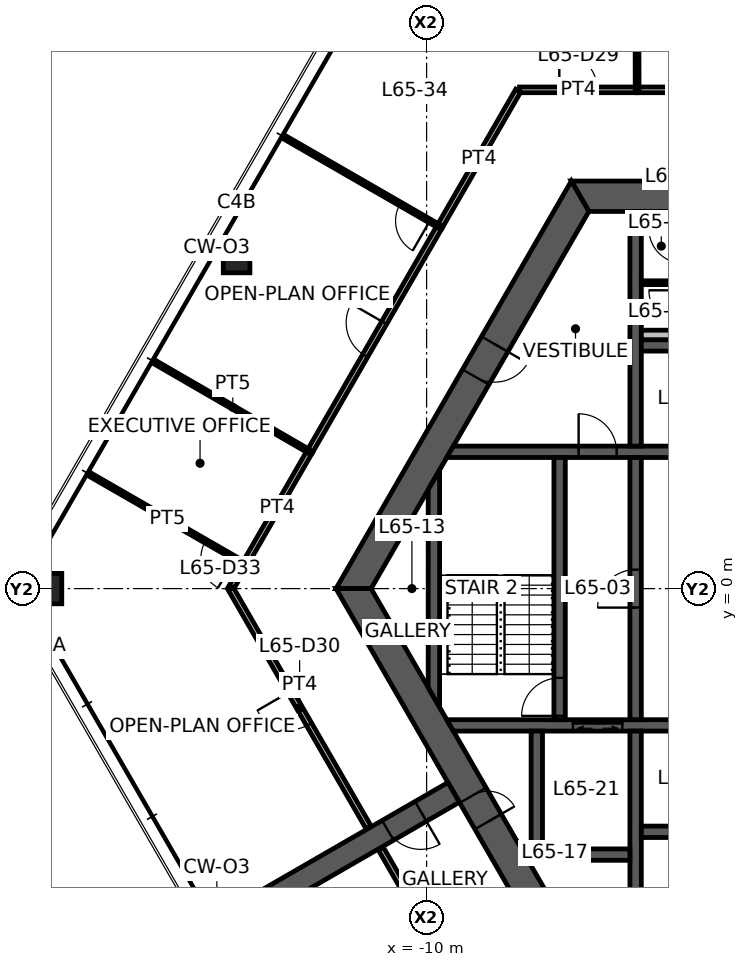
"""IFC4 building model, lengths in metres.
Left out: names, types, materials, properties, quantities, classifications, styles, units other than length and angle.
Written with IfcOpenShell. Run it as: python <this file> out.ifc"""

import sys

from ifc_helpers import new_model, si_unit, direction, frame, frame_2d, origin, origin_2d, place, context, subcontext, project, spatial, polyline, rectangle, hollow_rectangle, outline, extrude, element, fill, save


model = new_model("IFC4")
c1 = context("Model", 3, precision=1e-05, world=origin(), true_north=direction((0.0, 1.0)))
c2 = subcontext(c1, "Body", "Model", "MODEL_VIEW")
j1 = project(units=[si_unit("LENGTHUNIT", "METRE"), si_unit("PLANEANGLEUNIT", "RADIAN")], contexts=[c1])
p1 = place(None, origin())
s1 = spatial("IfcSite", under=j1, at=p1, CompositionType="ELEMENT")
p2 = place(p1, origin())
s2 = spatial("IfcBuilding", under=s1, at=p2, CompositionType="ELEMENT")
p3 = place(p2, frame((0.0, 0.0, 259.6)))
s3 = spatial("IfcBuildingStorey", under=s2, at=p3, CompositionType="ELEMENT", Elevation=259.6)
p4 = place(p3, frame((-20.0, 0.0, 0.0), z_axis=(0.0, 0.0, 1.0), x_axis=(1.0, 0.0, 0.0)))
e1 = element("IfcColumn", 1, at=p4, inside=s3, PredefinedType="COLUMN", context=c2, shape_type="SweptSolid", body=[
    extrude(hollow_rectangle(XDim=0.8, YDim=0.8, WallThickness=0.04, at=origin_2d()), origin(), (0.0, 0.0, 1.0), 3.9),
])
p5 = place(p3, frame((-15.0, 8.66, 0.0), z_axis=(0.0, 0.0, 1.0), x_axis=(1.0, 0.0, 0.0)))
e2 = element("IfcColumn", 2, at=p5, inside=s3, PredefinedType="COLUMN", context=c2, shape_type="SweptSolid", body=[
    extrude(hollow_rectangle(XDim=0.7, YDim=0.7, WallThickness=0.032, at=origin_2d()), origin(), (0.0, 0.0, 1.0), 3.9),
])
p6 = place(p3, frame((5.961, 10.325, 0.0), z_axis=(0.0, 0.0, 1.0), x_axis=(-1.0, 0.0, 0.0)))
e3 = element("IfcWall", 3, at=p6, inside=s3, PredefinedType="SHEAR", context=c2, shape_type="SweptSolid", body=[
    extrude(outline(polyline([(-0.231, -0.4), (4.636, -0.4), (5.536, -0.4), (6.386, -0.4), (7.286, -0.4), (12.153, -0.4), (11.691, 0.4), (7.286, 0.4), (6.386, 0.4), (5.536, 0.4), (4.636, 0.4), (0.231, 0.4), (-0.231, -0.4)])), origin(), (0.0, 0.0, 1.0), 3.9),
])
p7 = place(p6, frame((6.386, 0.0, 0.0)))
e4 = element("IfcOpeningElement", 4, at=p7, cuts=e3, PredefinedType="OPENING", context=c2, shape_type="SweptSolid", body=[
    extrude(rectangle(XDim=0.9, YDim=2.1, at=frame_2d((0.45, 1.05))), frame((0.0, 0.41, 0.0), z_axis=(0.0, -1.0, 0.0), x_axis=(1.0, 0.0, 0.0)), (0.0, 0.0, 1.0), 0.82),
])
p8 = place(p6, frame((4.636, 0.0, 0.0)))
e5 = element("IfcOpeningElement", 5, at=p8, cuts=e3, PredefinedType="OPENING", context=c2, shape_type="SweptSolid", body=[
    extrude(rectangle(XDim=0.9, YDim=2.1, at=frame_2d((0.45, 1.05))), frame((0.0, 0.41, 0.0), z_axis=(0.0, -1.0, 0.0), x_axis=(1.0, 0.0, 0.0)), (0.0, 0.0, 1.0), 0.82),
])
p9 = place(p3, frame((-5.961, 10.325, 0.0), z_axis=(0.0, 0.0, 1.0), x_axis=(-0.500004296715, -0.866022923061, 0.0)))
e6 = element("IfcWall", 6, at=p9, inside=s3, PredefinedType="SHEAR", context=c2, shape_type="SweptSolid", body=[
    extrude(outline(polyline([(-0.231, -0.4), (4.494, -0.4), (5.494, -0.4), (12.153, -0.4), (11.691, 0.4), (5.494, 0.4), (4.494, 0.4), (0.231, 0.4), (-0.231, -0.4)])), origin(), (0.0, 0.0, 1.0), 3.9),
])
p10 = place(p9, frame((4.494, 0.0, 0.0)))
e7 = element("IfcOpeningElement", 7, at=p10, cuts=e6, PredefinedType="OPENING", context=c2, shape_type="SweptSolid", body=[
    extrude(rectangle(XDim=1.0, YDim=2.1, at=frame_2d((0.5, 1.05))), frame((0.0, 0.41, 0.0), z_axis=(0.0, -1.0, 0.0), x_axis=(1.0, 0.0, 0.0)), (0.0, 0.0, 1.0), 0.82),
])
p11 = place(p3, frame((-11.922, 0.0, 0.0), z_axis=(0.0, 0.0, 1.0), x_axis=(0.500004296715, -0.866022923061, 0.0)))
e8 = element("IfcWall", 8, at=p11, inside=s3, PredefinedType="SHEAR", context=c2, shape_type="SweptSolid", body=[
    extrude(outline(polyline([(-0.231, -0.4), (6.281, -0.4), (7.081, -0.4), (12.153, -0.4), (11.691, 0.4), (7.081, 0.4), (6.281, 0.4), (0.231, 0.4), (-0.231, -0.4)])), origin(), (0.0, 0.0, 1.0), 3.9),
])
p12 = place(p11, frame((6.281, 0.0, 0.0)))
e9 = element("IfcOpeningElement", 9, at=p12, cuts=e8, PredefinedType="OPENING", context=c2, shape_type="SweptSolid", body=[
    extrude(rectangle(XDim=0.8, YDim=2.1, at=frame_2d((0.4, 1.05))), frame((0.0, 0.41, 0.0), z_axis=(0.0, -1.0, 0.0), x_axis=(1.0, 0.0, 0.0)), (0.0, 0.0, 1.0), 0.82),
])
p13 = place(p3, frame((-9.288, -5.363, 0.0), z_axis=(0.0, 0.0, 1.0), x_axis=(-0.866027473358, -0.499996415376, 0.0)))
e10 = element("IfcWall", 10, at=p13, inside=s3, PredefinedType="SHEAR", context=c2, shape_type="SweptSolid", body=[
    extrude(rectangle(XDim=7.045, YDim=0.6, at=frame_2d((3.523, 0.0))), origin(), (0.0, 0.0, 1.0), 3.9),
])
p14 = place(p13, frame((1.0, 0.0, 0.0)))
e11 = element("IfcOpeningElement", 11, at=p14, cuts=e10, PredefinedType="OPENING", context=c2, shape_type="SweptSolid", body=[
    extrude(rectangle(XDim=1.0, YDim=2.1, at=frame_2d((0.5, 1.05))), frame((0.0, 0.31, 0.0), z_axis=(0.0, -1.0, 0.0), x_axis=(1.0, 0.0, 0.0)), (0.0, 0.0, 1.0), 0.62),
])
p15 = place(p3, frame((-9.382, 3.6, 0.0), z_axis=(0.0, 0.0, 1.0), x_axis=(1.0, 0.0, 0.0)))
e12 = element("IfcWall", 12, at=p15, inside=s3, PredefinedType="SHEAR", context=c2, shape_type="SweptSolid", body=[
    extrude(outline(polyline([(-0.087, -0.15), (3.382, -0.15), (4.382, -0.15), (5.782, -0.15), (6.882, -0.15), (7.932, -0.15), (7.932, 0.15), (6.882, 0.15), (5.782, 0.15), (4.382, 0.15), (3.382, 0.15), (0.087, 0.15), (-0.087, -0.15)])), origin(), (0.0, 0.0, 1.0), 3.9),
])
p16 = place(p15, frame((3.382, 0.0, 0.0)))
e13 = element("IfcOpeningElement", 13, at=p16, cuts=e12, PredefinedType="OPENING", context=c2, shape_type="SweptSolid", body=[
    extrude(rectangle(XDim=1.0, YDim=2.1, at=frame_2d((0.5, 1.05))), frame((0.0, 0.16, 0.0), z_axis=(0.0, -1.0, 0.0), x_axis=(1.0, 0.0, 0.0)), (0.0, 0.0, 1.0), 0.32),
])
p17 = place(p15, frame((5.782, 0.0, 0.0)))
e14 = element("IfcOpeningElement", 14, at=p17, cuts=e12, PredefinedType="OPENING", context=c2, shape_type="SweptSolid", body=[
    extrude(rectangle(XDim=1.1, YDim=2.1, at=frame_2d((0.55, 1.05))), frame((0.0, 0.16, 0.0), z_axis=(0.0, -1.0, 0.0), x_axis=(1.0, 0.0, 0.0)), (0.0, 0.0, 1.0), 0.32),
])
p18 = place(p3, frame((-9.382, -3.6, 0.0), z_axis=(0.0, 0.0, 1.0), x_axis=(1.0, 0.0, 0.0)))
e15 = element("IfcWall", 15, at=p18, inside=s3, PredefinedType="SHEAR", context=c2, shape_type="SweptSolid", body=[
    extrude(outline(polyline([(0.087, -0.15), (3.232, -0.15), (4.532, -0.15), (5.782, -0.15), (6.882, -0.15), (7.932, -0.15), (7.932, 0.15), (6.882, 0.15), (5.782, 0.15), (4.532, 0.15), (3.232, 0.15), (-0.087, 0.15), (0.087, -0.15)])), origin(), (0.0, 0.0, 1.0), 3.9),
])
p19 = place(p18, frame((5.782, 0.0, 0.0)))
e16 = element("IfcOpeningElement", 16, at=p19, cuts=e15, PredefinedType="OPENING", context=c2, shape_type="SweptSolid", body=[
    extrude(rectangle(XDim=1.1, YDim=2.1, at=frame_2d((0.55, 1.05))), frame((0.0, 0.16, 0.0), z_axis=(0.0, -1.0, 0.0), x_axis=(1.0, 0.0, 0.0)), (0.0, 0.0, 1.0), 0.32),
])
p20 = place(p18, frame((3.232, 0.0, 0.0)))
e17 = element("IfcOpeningElement", 17, at=p20, cuts=e15, PredefinedType="OPENING", context=c2, shape_type="SweptSolid", body=[
    extrude(rectangle(XDim=1.3, YDim=2.1, at=frame_2d((0.65, 1.05))), frame((0.0, 0.16, 0.0), z_axis=(0.0, -1.0, 0.0), x_axis=(1.0, 0.0, 0.0)), (0.0, 0.0, 1.0), 0.32),
])
p21 = place(p3, frame((-4.5, -3.45, 0.0), z_axis=(0.0, 0.0, 1.0), x_axis=(0.0, 1.0, 0.0)))
e18 = element("IfcWall", 18, at=p21, inside=s3, PredefinedType="SHEAR", context=c2, shape_type="SweptSolid", body=[
    extrude(rectangle(XDim=6.9, YDim=0.3, at=frame_2d((3.45, 0.0))), origin(), (0.0, 0.0, 1.0), 3.9),
])
p22 = place(p21, frame((2.95, 0.0, 0.0)))
e19 = element("IfcOpeningElement", 19, at=p22, cuts=e18, PredefinedType="OPENING", context=c2, shape_type="SweptSolid", body=[
    extrude(rectangle(XDim=1.0, YDim=2.1, at=frame_2d((0.5, 1.05))), frame((0.0, 0.16, 0.0), z_axis=(0.0, -1.0, 0.0), x_axis=(1.0, 0.0, 0.0)), (0.0, 0.0, 1.0), 0.32),
])
p23 = place(p3, frame((-6.5, -3.45, 0.0), z_axis=(0.0, 0.0, 1.0), x_axis=(0.0, 1.0, 0.0)))
e20 = element("IfcWall", 20, at=p23, inside=s3, PredefinedType="SHEAR", context=c2, shape_type="SweptSolid", body=[
    extrude(rectangle(XDim=6.9, YDim=0.3, at=frame_2d((3.45, 0.0))), origin(), (0.0, 0.0, 1.0), 3.9),
])
p24 = place(p23, frame((0.1, 0.0, 0.0)))
e21 = element("IfcOpeningElement", 21, at=p24, cuts=e20, PredefinedType="OPENING", context=c2, shape_type="SweptSolid", body=[
    extrude(rectangle(XDim=1.0, YDim=2.1, at=frame_2d((0.5, 1.05))), frame((0.0, 0.16, 0.0), z_axis=(0.0, -1.0, 0.0), x_axis=(1.0, 0.0, 0.0)), (0.0, 0.0, 1.0), 0.32),
])
for number, where, z_axis, x_axis in (
    (22, (-4.5, 3.75, 0.0), (0.0, 0.0, 1.0), (0.0, 1.0, 0.0)),
    (23, (-4.5, -3.75, 0.0), (0.0, 0.0, 1.0), (0.0, -1.0, 0.0)),
):
    element("IfcWall", number, at=place(p3, frame(where, z_axis=z_axis, x_axis=x_axis)), inside=s3, PredefinedType="SHEAR", context=c2, shape_type="SweptSolid", body=[
        extrude(rectangle(XDim=6.175, YDim=0.3, at=frame_2d((3.087, 0.0))), origin(), (0.0, 0.0, 1.0), 3.9),
    ])
for number, where, z_axis, x_axis in (
    (24, (-4.35, 6.4, 0.0), (0.0, 0.0, 1.0), (1.0, 0.0, 0.0)),
    (25, (-4.35, -6.4, 0.0), (0.0, 0.0, 1.0), (1.0, 0.0, 0.0)),
    (26, (-7.25, -7.0, 0.0), (0.0, 0.0, 1.0), (1.0, 0.0, 0.0)),
):
    element("IfcWall", number, at=place(p3, frame(where, z_axis=z_axis, x_axis=x_axis)), inside=s3, PredefinedType="SHEAR", context=c2, shape_type="SweptSolid", body=[
        extrude(rectangle(XDim=2.6, YDim=0.3, at=frame_2d((1.3, 0.0))), origin(), (0.0, 0.0, 1.0), 3.9),
    ])
p25 = place(p3, frame((-7.1, -3.75, 0.0), z_axis=(0.0, 0.0, 1.0), x_axis=(0.0, -1.0, 0.0)))
e27 = element("IfcWall", 27, at=p25, inside=s3, PredefinedType="SHEAR", context=c2, shape_type="SweptSolid", body=[
    extrude(rectangle(XDim=3.1, YDim=0.3, at=frame_2d((1.55, 0.0))), origin(), (0.0, 0.0, 1.0), 3.9),
])
p26 = place(p3, frame((-9.808, -2.862, 0.0), z_axis=(0.0, 0.0, 1.0), x_axis=(0.0, 1.0, 0.0)))
e28 = element("IfcWall", 28, at=p26, inside=s3, PredefinedType="SHEAR", context=c2, shape_type="SweptSolid", body=[
    extrude(outline(polyline([(-0.26, -0.15), (5.984, -0.15), (5.465, 0.15), (0.26, 0.15), (-0.26, -0.15)])), origin(), (0.0, 0.0, 1.0), 3.9),
])
p27 = place(p3, frame((-4.35, 6.675, 0.0), z_axis=(0.0, 0.0, 1.0), x_axis=(1.0, 0.0, 0.0)))
e29 = element("IfcWall", 29, at=p27, inside=s3, PredefinedType="PLUMBINGWALL", context=c2, shape_type="SweptSolid", body=[
    extrude(rectangle(XDim=2.6, YDim=0.25, at=frame_2d((1.3, 0.0))), origin(), (0.0, 0.0, 1.0), 3.9),
])
p28 = place(p3, frame((-3.3, 8.05, 0.0), z_axis=(0.0, 0.0, 1.0), x_axis=(-1.0, 0.0, 0.0)))
e30 = element("IfcWall", 30, at=p28, inside=s3, PredefinedType="PARTITIONING", context=c2, shape_type="SweptSolid", body=[
    extrude(rectangle(XDim=1.05, YDim=0.1, at=frame_2d((0.525, 0.0))), origin(), (0.0, 0.0, 1.0), 2.95),
])
p29 = place(p3, frame((-4.47, 13.125, 0.0), z_axis=(0.0, 0.0, 1.0), x_axis=(1.0, 0.0, 0.0)))
e31 = element("IfcWall", 31, at=p29, inside=s3, PredefinedType="PARTITIONING", context=c2, shape_type="SweptSolid", body=[
    extrude(rectangle(XDim=2.575, YDim=0.15, at=frame_2d((1.288, 0.0))), origin(), (0.0, 0.0, 1.0), 2.95),
])
p30 = place(p29, frame((0.788, 0.0, 0.0)))
e32 = element("IfcOpeningElement", 32, at=p30, cuts=e31, PredefinedType="OPENING", context=c2, shape_type="SweptSolid", body=[
    extrude(rectangle(XDim=1.0, YDim=2.1, at=frame_2d((0.5, 1.05))), frame((0.0, 0.085, 0.0), z_axis=(0.0, -1.0, 0.0), x_axis=(1.0, 0.0, 0.0)), (0.0, 0.0, 1.0), 0.17),
])
p31 = place(p3, frame((-7.555, 13.125, 0.0), z_axis=(0.0, 0.0, 1.0), x_axis=(1.0, 0.0, 0.0)))
e33 = element("IfcWall", 33, at=p31, inside=s3, PredefinedType="PARTITIONING", context=c2, shape_type="SweptSolid", body=[
    extrude(rectangle(XDim=3.094, YDim=0.15, at=frame_2d((1.547, 0.0))), origin(), (0.0, 0.0, 1.0), 2.95),
])
p32 = place(p31, frame((1.047, 0.0, 0.0)))
e34 = element("IfcOpeningElement", 34, at=p32, cuts=e33, PredefinedType="OPENING", context=c2, shape_type="SweptSolid", body=[
    extrude(rectangle(XDim=1.0, YDim=2.1, at=frame_2d((0.5, 1.05))), frame((0.0, 0.085, 0.0), z_axis=(0.0, -1.0, 0.0), x_axis=(1.0, 0.0, 0.0)), (0.0, 0.0, 1.0), 0.17),
])
p33 = place(p3, frame((-4.46, 13.125, 0.0), z_axis=(0.0, 0.0, 1.0), x_axis=(-0.001656637364, 0.999998627775, 0.0)))
e35 = element("IfcWall", 35, at=p33, inside=s3, PredefinedType="PARTITIONING", context=c2, shape_type="SweptSolid", body=[
    extrude(rectangle(XDim=2.8, YDim=0.1, at=frame_2d((1.4, 0.0))), origin(), (0.0, 0.0, 1.0), 2.95),
])
p34 = place(p3, frame((-9.661, 9.516, 0.0), z_axis=(0.0, 0.0, 1.0), x_axis=(0.499997836828, 0.866026652689, 0.0)))
e36 = element("IfcWall", 36, at=p34, inside=s3, PredefinedType="PARTITIONING", context=c2, shape_type="SweptSolid", body=[
    extrude(rectangle(XDim=4.144, YDim=0.15, at=frame_2d((2.072, 0.0))), origin(), (0.0, 0.0, 1.0), 2.95),
])
p35 = place(p3, frame((-14.785, 0.642, 0.0), z_axis=(0.0, 0.0, 1.0), x_axis=(0.500032973541, 0.866006365664, 0.0)))
e37 = element("IfcWall", 37, at=p35, inside=s3, PredefinedType="PARTITIONING", context=c2, shape_type="SweptSolid", body=[
    extrude(rectangle(XDim=3.426, YDim=0.15, at=frame_2d((1.713, 0.0))), origin(), (0.0, 0.0, 1.0), 2.95),
])
p36 = place(p3, frame((-15.156, 0.0, 0.0), z_axis=(0.0, 0.0, 1.0), x_axis=(0.500088105676, 0.865974529972, 0.0)))
e38 = element("IfcWall", 38, at=p36, inside=s3, PredefinedType="PARTITIONING", context=c2, shape_type="SweptSolid", body=[
    extrude(rectangle(XDim=0.751, YDim=0.15, at=frame_2d((0.375, 0.0))), origin(), (0.0, 0.0, 1.0), 2.95),
])
p37 = place(p3, frame((-11.527, -6.285, 0.0), z_axis=(0.0, 0.0, 1.0), x_axis=(-0.500002959843, 0.866023694911, 0.0)))
e39 = element("IfcWall", 39, at=p37, inside=s3, PredefinedType="PARTITIONING", context=c2, shape_type="SweptSolid", body=[
    extrude(rectangle(XDim=7.258, YDim=0.15, at=frame_2d((3.629, 0.0))), origin(), (0.0, 0.0, 1.0), 2.95),
])
p38 = place(p37, frame((3.129, 0.0, 0.0)))
e40 = element("IfcOpeningElement", 40, at=p38, cuts=e39, PredefinedType="OPENING", context=c2, shape_type="SweptSolid", body=[
    extrude(rectangle(XDim=1.0, YDim=2.1, at=frame_2d((0.5, 1.05))), frame((0.0, 0.085, 0.0), z_axis=(0.0, -1.0, 0.0), x_axis=(1.0, 0.0, 0.0)), (0.0, 0.0, 1.0), 0.17),
])
p39 = place(p3, frame((-13.077, 3.601, 0.0), z_axis=(0.0, 0.0, 1.0), x_axis=(0.500004632818, 0.866022729009, 0.0)))
e41 = element("IfcWall", 41, at=p39, inside=s3, PredefinedType="PARTITIONING", context=c2, shape_type="SweptSolid", body=[
    extrude(rectangle(XDim=6.84, YDim=0.15, at=frame_2d((3.42, 0.0))), origin(), (0.0, 0.0, 1.0), 2.95),
])
p40 = place(p39, frame((2.92, 0.0, 0.0)))
e42 = element("IfcOpeningElement", 42, at=p40, cuts=e41, PredefinedType="OPENING", context=c2, shape_type="SweptSolid", body=[
    extrude(rectangle(XDim=1.0, YDim=2.1, at=frame_2d((0.5, 1.05))), frame((0.0, 0.085, 0.0), z_axis=(0.0, -1.0, 0.0), x_axis=(1.0, 0.0, 0.0)), (0.0, 0.0, 1.0), 0.17),
])
p41 = place(p3, frame((-9.656, 9.524, 0.0), z_axis=(0.0, 0.0, 1.0), x_axis=(-0.866526579402, 0.499130931911, 0.0)))
e43 = element("IfcWall", 43, at=p41, inside=s3, PredefinedType="PARTITIONING", context=c2, shape_type="SweptSolid", body=[
    extrude(rectangle(XDim=4.705, YDim=0.1, at=frame_2d((2.353, 0.0))), origin(), (0.0, 0.0, 1.0), 2.95),
])
p42 = place(p41, frame((0.3, 0.0, 0.0)))
e44 = element("IfcOpeningElement", 44, at=p42, cuts=e43, PredefinedType="OPENING", context=c2, shape_type="SweptSolid", body=[
    extrude(rectangle(XDim=0.9, YDim=2.1, at=frame_2d((0.45, 1.05))), frame((0.0, 0.06, 0.0), z_axis=(0.0, -1.0, 0.0), x_axis=(1.0, 0.0, 0.0)), (0.0, 0.0, 1.0), 0.12),
])
p43 = place(p3, frame((-14.78, 0.651, 0.0), z_axis=(0.0, 0.0, 1.0), x_axis=(-0.866504138439, 0.499169888984, 0.0)))
e45 = element("IfcWall", 45, at=p43, inside=s3, PredefinedType="PARTITIONING", context=c2, shape_type="SweptSolid", body=[
    extrude(rectangle(XDim=4.706, YDim=0.1, at=frame_2d((2.353, 0.0))), origin(), (0.0, 0.0, 1.0), 2.95),
])
p44 = place(p43, frame((0.3, 0.0, 0.0)))
e46 = element("IfcOpeningElement", 46, at=p44, cuts=e45, PredefinedType="OPENING", context=c2, shape_type="SweptSolid", body=[
    extrude(rectangle(XDim=0.9, YDim=2.1, at=frame_2d((0.45, 1.05))), frame((0.0, 0.06, 0.0), z_axis=(0.0, -1.0, 0.0), x_axis=(1.0, 0.0, 0.0)), (0.0, 0.0, 1.0), 0.12),
])
p45 = place(p3, frame((-17.123, 5.942, 0.0), z_axis=(0.0, 0.0, 1.0), x_axis=(0.86551803214, -0.500877765568, 0.0)))
e47 = element("IfcWall", 47, at=p45, inside=s3, PredefinedType="PARTITIONING", context=c2, shape_type="SweptSolid", body=[
    extrude(rectangle(XDim=4.675, YDim=0.1, at=frame_2d((2.338, 0.0))), origin(), (0.0, 0.0, 1.0), 2.95),
])
p46 = place(p3, frame((-10.564, -7.952, 0.0), z_axis=(0.0, 0.0, 1.0), x_axis=(-0.500084415177, 0.865976661173, 0.0)))
e48 = element("IfcWall", 48, at=p46, inside=s3, PredefinedType="PARTITIONING", context=c2, shape_type="SweptSolid", body=[
    extrude(rectangle(XDim=1.284, YDim=0.15, at=frame_2d((0.642, 0.0))), origin(), (0.0, 0.0, 1.0), 2.95),
])
p47 = place(p12, origin())
e49 = element("IfcDoor", 49, at=p47, inside=s3, OperationType="SINGLE_SWING_RIGHT", PredefinedType="DOOR", context=c2, shape_type="SweptSolid", body=[
    extrude(rectangle(XDim=0.8, YDim=2.1, at=frame_2d((0.4, 1.05))), frame((0.0, 0.025, 0.0), z_axis=(0.0, -1.0, 0.0), x_axis=(1.0, 0.0, 0.0)), (0.0, 0.0, 1.0), 0.05),
])
fill(e9, e49)
p48 = place(p10, origin())
e50 = element("IfcDoor", 50, at=p48, inside=s3, OperationType="SINGLE_SWING_LEFT", PredefinedType="DOOR", context=c2, shape_type="SweptSolid", body=[
    extrude(rectangle(XDim=1.0, YDim=2.1, at=frame_2d((0.5, 1.05))), frame((0.0, 0.025, 0.0), z_axis=(0.0, -1.0, 0.0), x_axis=(1.0, 0.0, 0.0)), (0.0, 0.0, 1.0), 0.05),
])
fill(e7, e50)
p49 = place(p22, origin())
e51 = element("IfcDoor", 51, at=p49, inside=s3, OperationType="SINGLE_SWING_LEFT", PredefinedType="DOOR", context=c2, shape_type="SweptSolid", body=[
    extrude(rectangle(XDim=1.0, YDim=2.1, at=frame_2d((0.5, 1.05))), frame((0.0, 0.025, 0.0), z_axis=(0.0, -1.0, 0.0), x_axis=(1.0, 0.0, 0.0)), (0.0, 0.0, 1.0), 0.05),
])
fill(e19, e51)
p50 = place(p24, origin())
e52 = element("IfcDoor", 52, at=p50, inside=s3, OperationType="SINGLE_SWING_LEFT", PredefinedType="DOOR", context=c2, shape_type="SweptSolid", body=[
    extrude(rectangle(XDim=1.0, YDim=2.1, at=frame_2d((0.5, 1.05))), frame((0.0, 0.025, 0.0), z_axis=(0.0, -1.0, 0.0), x_axis=(1.0, 0.0, 0.0)), (0.0, 0.0, 1.0), 0.05),
])
fill(e21, e52)
p51 = place(p16, origin())
e53 = element("IfcDoor", 53, at=p51, inside=s3, OperationType="SINGLE_SWING_LEFT", PredefinedType="DOOR", context=c2, shape_type="SweptSolid", body=[
    extrude(rectangle(XDim=1.0, YDim=2.1, at=frame_2d((0.5, 1.05))), frame((0.0, 0.025, 0.0), z_axis=(0.0, -1.0, 0.0), x_axis=(1.0, 0.0, 0.0)), (0.0, 0.0, 1.0), 0.05),
])
fill(e13, e53)
p52 = place(p14, origin())
e54 = element("IfcDoor", 54, at=p52, inside=s3, OperationType="SINGLE_SWING_LEFT", PredefinedType="DOOR", context=c2, shape_type="SweptSolid", body=[
    extrude(rectangle(XDim=1.0, YDim=2.1, at=frame_2d((0.5, 1.05))), frame((0.0, 0.025, 0.0), z_axis=(0.0, -1.0, 0.0), x_axis=(1.0, 0.0, 0.0)), (0.0, 0.0, 1.0), 0.05),
])
fill(e11, e54)
p53 = place(p30, origin())
e55 = element("IfcDoor", 55, at=p53, inside=s3, OperationType="SINGLE_SWING_RIGHT", PredefinedType="DOOR", context=c2, shape_type="SweptSolid", body=[
    extrude(rectangle(XDim=1.0, YDim=2.1, at=frame_2d((0.5, 1.05))), frame((0.0, 0.025, 0.0), z_axis=(0.0, -1.0, 0.0), x_axis=(1.0, 0.0, 0.0)), (0.0, 0.0, 1.0), 0.05),
])
fill(e32, e55)
p54 = place(p32, origin())
e56 = element("IfcDoor", 56, at=p54, inside=s3, OperationType="SINGLE_SWING_LEFT", PredefinedType="DOOR", context=c2, shape_type="SweptSolid", body=[
    extrude(rectangle(XDim=1.0, YDim=2.1, at=frame_2d((0.5, 1.05))), frame((0.0, 0.025, 0.0), z_axis=(0.0, -1.0, 0.0), x_axis=(1.0, 0.0, 0.0)), (0.0, 0.0, 1.0), 0.05),
])
fill(e34, e56)
p55 = place(p38, origin())
e57 = element("IfcDoor", 57, at=p55, inside=s3, OperationType="SINGLE_SWING_RIGHT", PredefinedType="DOOR", context=c2, shape_type="SweptSolid", body=[
    extrude(rectangle(XDim=1.0, YDim=2.1, at=frame_2d((0.5, 1.05))), frame((0.0, 0.025, 0.0), z_axis=(0.0, -1.0, 0.0), x_axis=(1.0, 0.0, 0.0)), (0.0, 0.0, 1.0), 0.05),
])
fill(e40, e57)
p56 = place(p40, origin())
e58 = element("IfcDoor", 58, at=p56, inside=s3, OperationType="SINGLE_SWING_RIGHT", PredefinedType="DOOR", context=c2, shape_type="SweptSolid", body=[
    extrude(rectangle(XDim=1.0, YDim=2.1, at=frame_2d((0.5, 1.05))), frame((0.0, 0.025, 0.0), z_axis=(0.0, -1.0, 0.0), x_axis=(1.0, 0.0, 0.0)), (0.0, 0.0, 1.0), 0.05),
])
fill(e42, e58)
p57 = place(p42, origin())
e59 = element("IfcDoor", 59, at=p57, inside=s3, OperationType="SINGLE_SWING_LEFT", PredefinedType="DOOR", context=c2, shape_type="SweptSolid", body=[
    extrude(rectangle(XDim=0.9, YDim=2.1, at=frame_2d((0.45, 1.05))), frame((0.0, 0.025, 0.0), z_axis=(0.0, -1.0, 0.0), x_axis=(1.0, 0.0, 0.0)), (0.0, 0.0, 1.0), 0.05),
])
fill(e44, e59)
p58 = place(p44, origin())
e60 = element("IfcDoor", 60, at=p58, inside=s3, OperationType="SINGLE_SWING_LEFT", PredefinedType="DOOR", context=c2, shape_type="SweptSolid", body=[
    extrude(rectangle(XDim=0.9, YDim=2.1, at=frame_2d((0.45, 1.05))), frame((0.0, 0.025, 0.0), z_axis=(0.0, -1.0, 0.0), x_axis=(1.0, 0.0, 0.0)), (0.0, 0.0, 1.0), 0.05),
])
fill(e46, e60)
p59 = place(p20, origin())
e61 = element("IfcDoor", 61, at=p59, inside=s3, OperationType="DOUBLE_DOOR_SLIDING", PredefinedType="DOOR", context=c2, shape_type="SweptSolid", body=[
    extrude(rectangle(XDim=1.3, YDim=2.1, at=frame_2d((0.65, 1.05))), frame((0.0, 0.025, 0.0), z_axis=(0.0, -1.0, 0.0), x_axis=(1.0, 0.0, 0.0)), (0.0, 0.0, 1.0), 0.05),
])
fill(e17, e61)
save(model, sys.argv[1])
